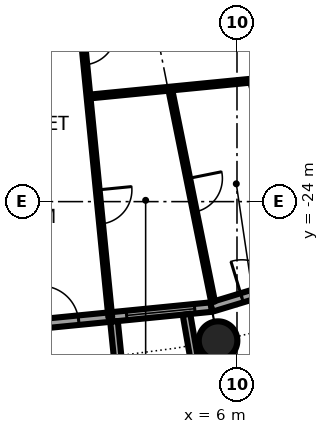
"""IFC4 building model, lengths in metres.
Left out: names, types, materials, properties, quantities, classifications, styles, units other than length and angle.
Written with IfcOpenShell. Run it as: python <this file> out.ifc"""

import sys

from ifc_helpers import new_model, si_unit, direction, frame, frame_2d, origin, origin_2d, place, context, subcontext, project, spatial, rectangle, hollow_circle, extrude, element, fill, save


model = new_model("IFC4")
c1 = context("Model", 3, precision=1e-05, world=origin(), true_north=direction((0.0, 1.0)))
c2 = subcontext(c1, "Body", "Model", "MODEL_VIEW")
j1 = project(units=[si_unit("LENGTHUNIT", "METRE"), si_unit("PLANEANGLEUNIT", "RADIAN")], contexts=[c1])
p1 = place(None, origin())
s1 = spatial("IfcSite", under=j1, at=p1, CompositionType="ELEMENT")
p2 = place(p1, origin())
s2 = spatial("IfcBuilding", under=s1, at=p2, CompositionType="ELEMENT")
p3 = place(p2, frame((0.0, 0.0, 63.6)))
s3 = spatial("IfcBuildingStorey", under=s2, at=p3, CompositionType="ELEMENT", Elevation=63.6)
p4 = place(p3, frame((5.501, -27.658, 0.0), z_axis=(0.0, 0.0, 1.0), x_axis=(1.0, 0.0, 0.0)))
e1 = element("IfcColumn", 1, at=p4, inside=s3, PredefinedType="COLUMN", context=c2, shape_type="SweptSolid", body=[
    extrude(hollow_circle(Radius=0.508, WallThickness=0.04, at=origin_2d()), origin(), (0.0, 0.0, 1.0), 3.05),
])
p5 = place(p3, frame((0.0, -27.3, 0.0), z_axis=(0.0, 0.0, 1.0), x_axis=(0.995173996315, 0.098126026407, 0.0)))
e2 = element("IfcWall", 2, at=p5, inside=s3, PredefinedType="SOLIDWALL", context=c2, shape_type="SweptSolid", body=[
    extrude(rectangle(XDim=5.352, YDim=0.25, at=frame_2d((2.676, 0.0))), origin(), (0.0, 0.0, 1.0), 2.7),
])
p6 = place(p5, frame((0.841, 0.0, 0.0)))
e3 = element("IfcOpeningElement", 3, at=p6, cuts=e2, PredefinedType="OPENING", context=c2, shape_type="SweptSolid", body=[
    extrude(rectangle(XDim=1.0, YDim=2.2, at=frame_2d((0.5, 1.1))), frame((0.0, 0.135, 0.0), z_axis=(0.0, -1.0, 0.0), x_axis=(1.0, 0.0, 0.0)), (0.0, 0.0, 1.0), 0.27),
])
p7 = place(p5, frame((3.111, 0.0, 0.3)))
e4 = element("IfcOpeningElement", 4, at=p7, cuts=e2, PredefinedType="OPENING", context=c2, shape_type="SweptSolid", body=[
    extrude(rectangle(XDim=1.8, YDim=2.1, at=frame_2d((0.9, 1.05))), frame((0.0, 0.135, 0.0), z_axis=(0.0, -1.0, 0.0), x_axis=(1.0, 0.0, 0.0)), (0.0, 0.0, 1.0), 0.27),
])
p8 = place(p3, frame((2.764, -27.153, -0.03), z_axis=(0.0, 0.0, 1.0), x_axis=(0.101505487237, -0.994834979311, 0.0)))
e5 = element("IfcWall", 5, at=p8, inside=s3, PredefinedType="SOLIDWALL", context=c2, shape_type="SweptSolid", body=[
    extrude(rectangle(XDim=3.007, YDim=0.2, at=frame_2d((1.503, 0.0))), origin(), (0.0, 0.0, 1.0), 2.73),
])
p9 = place(p3, frame((4.671, -26.966, -0.03), z_axis=(0.0, 0.0, 1.0), x_axis=(0.170539878907, -0.985350774954, 0.0)))
e6 = element("IfcWall", 6, at=p9, inside=s3, PredefinedType="SOLIDWALL", context=c2, shape_type="SweptSolid", body=[
    extrude(rectangle(XDim=2.932, YDim=0.2, at=frame_2d((1.466, 0.0))), origin(), (0.0, 0.0, 1.0), 2.73),
])
p10 = place(p3, frame((5.326, -26.775, 0.0), z_axis=(0.0, 0.0, 1.0), x_axis=(0.956965678721, 0.290201119486, 0.0)))
e7 = element("IfcWall", 7, at=p10, inside=s3, PredefinedType="SOLIDWALL", context=c2, shape_type="SweptSolid", body=[
    extrude(rectangle(XDim=5.351, YDim=0.25, at=frame_2d((2.676, 0.0))), origin(), (0.0, 0.0, 1.0), 2.7),
])
p11 = place(p10, frame((0.841, 0.0, 0.0)))
e8 = element("IfcOpeningElement", 8, at=p11, cuts=e7, PredefinedType="OPENING", context=c2, shape_type="SweptSolid", body=[
    extrude(rectangle(XDim=1.0, YDim=2.2, at=frame_2d((0.5, 1.1))), frame((0.0, 0.135, 0.0), z_axis=(0.0, -1.0, 0.0), x_axis=(1.0, 0.0, 0.0)), (0.0, 0.0, 1.0), 0.27),
])
p12 = place(p10, frame((3.111, 0.0, 0.3)))
e9 = element("IfcOpeningElement", 9, at=p12, cuts=e7, PredefinedType="OPENING", context=c2, shape_type="SweptSolid", body=[
    extrude(rectangle(XDim=1.8, YDim=2.1, at=frame_2d((0.9, 1.05))), frame((0.0, 0.135, 0.0), z_axis=(0.0, -1.0, 0.0), x_axis=(1.0, 0.0, 0.0)), (0.0, 0.0, 1.0), 0.27),
])
p13 = place(p3, frame((2.089, -21.238, 0.0), z_axis=(0.0, 0.0, 1.0), x_axis=(0.995211787668, 0.097741995509, 0.0)))
e10 = element("IfcWall", 10, at=p13, inside=s3, PredefinedType="PARTITIONING", context=c2, shape_type="SweptSolid", body=[
    extrude(rectangle(XDim=6.477, YDim=0.1, at=frame_2d((3.238, 0.0))), origin(), (0.0, 0.0, 1.0), 2.7),
])
p14 = place(p3, frame((1.838, -18.666, 0.0), z_axis=(0.0, 0.0, 1.0), x_axis=(0.098366640075, -0.995150241984, 0.0)))
e11 = element("IfcWall", 11, at=p14, inside=s3, PredefinedType="PARTITIONING", context=c2, shape_type="SweptSolid", body=[
    extrude(rectangle(XDim=8.419, YDim=0.1, at=frame_2d((4.209, 0.0))), origin(), (0.0, 0.0, 1.0), 2.7),
])
p15 = place(p14, frame((0.842, 0.0, 0.0)))
e12 = element("IfcOpeningElement", 12, at=p15, cuts=e11, PredefinedType="OPENING", context=c2, shape_type="SweptSolid", body=[
    extrude(rectangle(XDim=0.9, YDim=2.3, at=frame_2d((0.45, 1.15))), frame((0.0, 0.06, 0.0), z_axis=(0.0, -1.0, 0.0), x_axis=(1.0, 0.0, 0.0)), (0.0, 0.0, 1.0), 0.12),
])
p16 = place(p14, frame((5.051, 0.0, 0.0)))
e13 = element("IfcOpeningElement", 13, at=p16, cuts=e11, PredefinedType="OPENING", context=c2, shape_type="SweptSolid", body=[
    extrude(rectangle(XDim=0.9, YDim=2.3, at=frame_2d((0.45, 1.15))), frame((0.0, 0.06, 0.0), z_axis=(0.0, -1.0, 0.0), x_axis=(1.0, 0.0, 0.0)), (0.0, 0.0, 1.0), 0.12),
])
p17 = place(p3, frame((4.239, -21.026, 0.0), z_axis=(0.0, 0.0, 1.0), x_axis=(0.197706555414, -0.980261249844, 0.0)))
e14 = element("IfcWall", 14, at=p17, inside=s3, PredefinedType="PARTITIONING", context=c2, shape_type="SweptSolid", body=[
    extrude(rectangle(XDim=5.726, YDim=0.1, at=frame_2d((2.863, 0.0))), origin(), (0.0, 0.0, 1.0), 2.7),
])
p18 = place(p17, frame((2.413, 0.0, 0.0)))
e15 = element("IfcOpeningElement", 15, at=p18, cuts=e14, PredefinedType="OPENING", context=c2, shape_type="SweptSolid", body=[
    extrude(rectangle(XDim=0.9, YDim=2.3, at=frame_2d((0.45, 1.15))), frame((0.0, 0.06, 0.0), z_axis=(0.0, -1.0, 0.0), x_axis=(1.0, 0.0, 0.0)), (0.0, 0.0, 1.0), 0.12),
])
p19 = place(p6, origin())
e16 = element("IfcDoor", 16, at=p19, inside=s3, OperationType="SINGLE_SWING_LEFT", PredefinedType="DOOR", context=c2, shape_type="SweptSolid", body=[
    extrude(rectangle(XDim=1.0, YDim=2.2, at=frame_2d((0.5, 1.1))), frame((0.0, 0.025, 0.0), z_axis=(0.0, -1.0, 0.0), x_axis=(1.0, 0.0, 0.0)), (0.0, 0.0, 1.0), 0.05),
])
fill(e3, e16)
p20 = place(p7, origin())
e17 = element("IfcWindow", 17, at=p20, inside=s3, PartitioningType="SINGLE_PANEL", PredefinedType="WINDOW", context=c2, shape_type="SweptSolid", body=[
    extrude(rectangle(XDim=1.8, YDim=2.1, at=frame_2d((0.9, 1.05))), frame((0.0, 0.03, 0.0), z_axis=(0.0, -1.0, 0.0), x_axis=(1.0, 0.0, 0.0)), (0.0, 0.0, 1.0), 0.06),
])
fill(e4, e17)
p21 = place(p11, origin())
e18 = element("IfcDoor", 18, at=p21, inside=s3, OperationType="SINGLE_SWING_LEFT", PredefinedType="DOOR", context=c2, shape_type="SweptSolid", body=[
    extrude(rectangle(XDim=1.0, YDim=2.2, at=frame_2d((0.5, 1.1))), frame((0.0, 0.025, 0.0), z_axis=(0.0, -1.0, 0.0), x_axis=(1.0, 0.0, 0.0)), (0.0, 0.0, 1.0), 0.05),
])
fill(e8, e18)
p22 = place(p15, origin())
e19 = element("IfcDoor", 19, at=p22, inside=s3, OperationType="SINGLE_SWING_LEFT", PredefinedType="DOOR", context=c2, shape_type="SweptSolid", body=[
    extrude(rectangle(XDim=0.9, YDim=2.3, at=frame_2d((0.45, 1.15))), frame((0.0, 0.025, 0.0), z_axis=(0.0, -1.0, 0.0), x_axis=(1.0, 0.0, 0.0)), (0.0, 0.0, 1.0), 0.05),
])
fill(e12, e19)
p23 = place(p16, origin())
e20 = element("IfcDoor", 20, at=p23, inside=s3, OperationType="SINGLE_SWING_RIGHT", PredefinedType="DOOR", context=c2, shape_type="SweptSolid", body=[
    extrude(rectangle(XDim=0.9, YDim=2.3, at=frame_2d((0.45, 1.15))), frame((0.0, 0.025, 0.0), z_axis=(0.0, -1.0, 0.0), x_axis=(1.0, 0.0, 0.0)), (0.0, 0.0, 1.0), 0.05),
])
fill(e13, e20)
p24 = place(p18, origin())
e21 = element("IfcDoor", 21, at=p24, inside=s3, OperationType="SINGLE_SWING_RIGHT", PredefinedType="DOOR", context=c2, shape_type="SweptSolid", body=[
    extrude(rectangle(XDim=0.9, YDim=2.3, at=frame_2d((0.45, 1.15))), frame((0.0, 0.025, 0.0), z_axis=(0.0, -1.0, 0.0), x_axis=(1.0, 0.0, 0.0)), (0.0, 0.0, 1.0), 0.05),
])
fill(e15, e21)
save(model, sys.argv[1])
